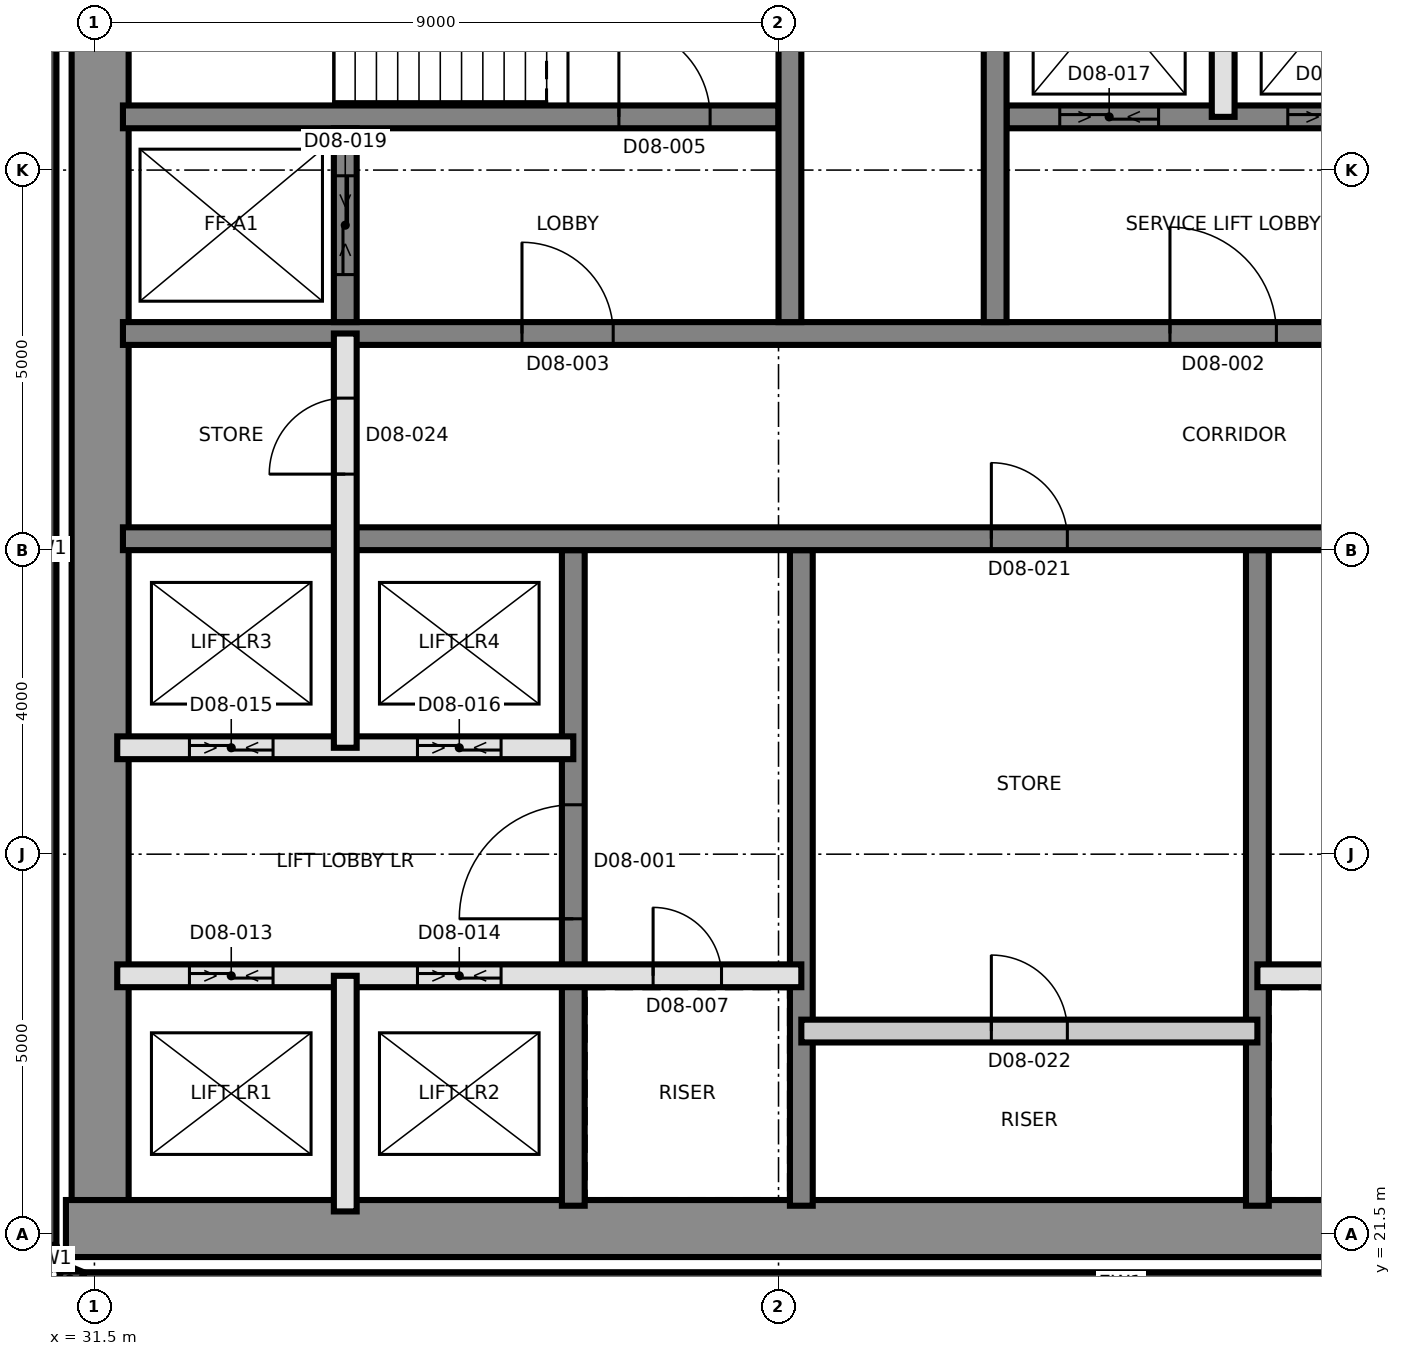
"""IFC4 building model, lengths in metres.
Left out: names, types, materials, properties, quantities, classifications, styles, units other than length and angle.
Written with IfcOpenShell. Run it as: python <this file> out.ifc"""

import sys

from ifc_helpers import new_model, si_unit, direction, frame, frame_2d, origin, place, context, subcontext, project, spatial, rectangle, extrude, element, fill, save


model = new_model("IFC4")
c1 = context("Model", 3, precision=1e-05, world=origin(), true_north=direction((0.0, 1.0)))
c2 = subcontext(c1, "Body", "Model", "MODEL_VIEW")
j1 = project(units=[si_unit("LENGTHUNIT", "METRE"), si_unit("PLANEANGLEUNIT", "RADIAN")], contexts=[c1])
p1 = place(None, origin())
s1 = spatial("IfcSite", under=j1, at=p1, CompositionType="ELEMENT")
p2 = place(p1, origin())
s2 = spatial("IfcBuilding", under=s1, at=p2, CompositionType="ELEMENT")
p3 = place(p2, frame((0.0, 0.0, 98.2)))
s3 = spatial("IfcBuildingStorey", under=s2, at=p3, CompositionType="ELEMENT", Elevation=98.2)
p4 = place(p3, frame((31.575, 21.875, 0.0), z_axis=(0.0, 0.0, 1.0), x_axis=(0.0, 1.0, 0.0)))
e1 = element("IfcWall", 1, at=p4, inside=s3, PredefinedType="SHEAR", context=c2, shape_type="SweptSolid", body=[
    extrude(rectangle(XDim=17.25, YDim=0.75, at=frame_2d((8.625, 0.0))), origin(), (0.0, 0.0, 1.0), 3.7),
])
p5 = place(p3, frame((31.125, 21.575, 0.0), z_axis=(0.0, 0.0, 1.0), x_axis=(1.0, 0.0, 0.0)))
e2 = element("IfcWall", 2, at=p5, inside=s3, PredefinedType="SHEAR", context=c2, shape_type="SweptSolid", body=[
    extrude(rectangle(XDim=27.0, YDim=0.75, at=frame_2d((13.5, 0.0))), origin(), (0.0, 0.0, 1.0), 3.7),
])
p6 = place(p3, frame((37.8, 21.875, 0.0), z_axis=(0.0, 0.0, 1.0), x_axis=(0.0, 1.0, 0.0)))
e3 = element("IfcWall", 3, at=p6, inside=s3, PredefinedType="SHEAR", context=c2, shape_type="SweptSolid", body=[
    extrude(rectangle(XDim=8.625, YDim=0.3, at=frame_2d((4.312, 0.0))), origin(), (0.0, 0.0, 1.0), 3.7),
])
p7 = place(p6, frame((3.775, 0.0, 0.0)))
e4 = element("IfcOpeningElement", 4, at=p7, cuts=e3, PredefinedType="OPENING", context=c2, shape_type="SweptSolid", body=[
    extrude(rectangle(XDim=1.5, YDim=2.1, at=frame_2d((0.75, 1.05))), frame((0.0, 0.16, 0.0), z_axis=(0.0, -1.0, 0.0), x_axis=(1.0, 0.0, 0.0)), (0.0, 0.0, 1.0), 0.32),
])
for number, where, z_axis, x_axis in (
    (5, (40.8, 21.875, 0.0), (0.0, 0.0, 1.0), (0.0, 1.0, 0.0)),
    (6, (46.8, 21.875, 0.0), (0.0, 0.0, 1.0), (0.0, 1.0, 0.0)),
):
    element("IfcWall", number, at=place(p3, frame(where, z_axis=z_axis, x_axis=x_axis)), inside=s3, PredefinedType="SHEAR", context=c2, shape_type="SweptSolid", body=[
        extrude(rectangle(XDim=8.625, YDim=0.3, at=frame_2d((4.312, 0.0))), origin(), (0.0, 0.0, 1.0), 3.7),
    ])
p8 = place(p3, frame((31.875, 30.65, 0.0), z_axis=(0.0, 0.0, 1.0), x_axis=(1.0, 0.0, 0.0)))
e7 = element("IfcWall", 7, at=p8, inside=s3, PredefinedType="SHEAR", context=c2, shape_type="SweptSolid", body=[
    extrude(rectangle(XDim=26.25, YDim=0.3, at=frame_2d((13.125, 0.0))), origin(), (0.0, 0.0, 1.0), 3.7),
])
p9 = place(p8, frame((24.625, 0.0, 0.0)))
e8 = element("IfcOpeningElement", 8, at=p9, cuts=e7, PredefinedType="OPENING", context=c2, shape_type="SweptSolid", body=[
    extrude(rectangle(XDim=1.0, YDim=2.1, at=frame_2d((0.5, 1.05))), frame((0.0, 0.16, 0.0), z_axis=(0.0, -1.0, 0.0), x_axis=(1.0, 0.0, 0.0)), (0.0, 0.0, 1.0), 0.32),
])
p10 = place(p8, frame((11.425, 0.0, 0.0)))
e9 = element("IfcOpeningElement", 9, at=p10, cuts=e7, PredefinedType="OPENING", context=c2, shape_type="SweptSolid", body=[
    extrude(rectangle(XDim=1.0, YDim=2.1, at=frame_2d((0.5, 1.05))), frame((0.0, 0.16, 0.0), z_axis=(0.0, -1.0, 0.0), x_axis=(1.0, 0.0, 0.0)), (0.0, 0.0, 1.0), 0.32),
])
p11 = place(p3, frame((31.875, 33.35, 0.0), z_axis=(0.0, 0.0, 1.0), x_axis=(1.0, 0.0, 0.0)))
e10 = element("IfcWall", 10, at=p11, inside=s3, PredefinedType="SHEAR", context=c2, shape_type="SweptSolid", body=[
    extrude(rectangle(XDim=26.25, YDim=0.3, at=frame_2d((13.125, 0.0))), origin(), (0.0, 0.0, 1.0), 3.7),
])
p12 = place(p11, frame((13.775, 0.0, 0.0)))
e11 = element("IfcOpeningElement", 11, at=p12, cuts=e10, PredefinedType="OPENING", context=c2, shape_type="SweptSolid", body=[
    extrude(rectangle(XDim=1.4, YDim=2.1, at=frame_2d((0.7, 1.05))), frame((0.0, 0.16, 0.0), z_axis=(0.0, -1.0, 0.0), x_axis=(1.0, 0.0, 0.0)), (0.0, 0.0, 1.0), 0.32),
])
p13 = place(p11, frame((5.25, 0.0, 0.0)))
e12 = element("IfcOpeningElement", 12, at=p13, cuts=e10, PredefinedType="OPENING", context=c2, shape_type="SweptSolid", body=[
    extrude(rectangle(XDim=1.2, YDim=2.1, at=frame_2d((0.6, 1.05))), frame((0.0, 0.16, 0.0), z_axis=(0.0, -1.0, 0.0), x_axis=(1.0, 0.0, 0.0)), (0.0, 0.0, 1.0), 0.32),
])
p14 = place(p11, frame((19.8, 0.0, 0.0)))
e13 = element("IfcOpeningElement", 13, at=p14, cuts=e10, PredefinedType="OPENING", context=c2, shape_type="SweptSolid", body=[
    extrude(rectangle(XDim=1.2, YDim=2.1, at=frame_2d((0.6, 1.05))), frame((0.0, 0.16, 0.0), z_axis=(0.0, -1.0, 0.0), x_axis=(1.0, 0.0, 0.0)), (0.0, 0.0, 1.0), 0.32),
])
p15 = place(p3, frame((31.875, 36.2, 0.0), z_axis=(0.0, 0.0, 1.0), x_axis=(1.0, 0.0, 0.0)))
e14 = element("IfcWall", 14, at=p15, inside=s3, PredefinedType="SHEAR", context=c2, shape_type="SweptSolid", body=[
    extrude(rectangle(XDim=8.625, YDim=0.3, at=frame_2d((4.312, 0.0))), origin(), (0.0, 0.0, 1.0), 3.7),
])
p16 = place(p15, frame((6.525, 0.0, 0.0)))
e15 = element("IfcOpeningElement", 15, at=p16, cuts=e14, PredefinedType="OPENING", context=c2, shape_type="SweptSolid", body=[
    extrude(rectangle(XDim=1.2, YDim=2.1, at=frame_2d((0.6, 1.05))), frame((0.0, 0.16, 0.0), z_axis=(0.0, -1.0, 0.0), x_axis=(1.0, 0.0, 0.0)), (0.0, 0.0, 1.0), 0.32),
])
p17 = place(p3, frame((43.5, 36.2, 0.0), z_axis=(0.0, 0.0, 1.0), x_axis=(1.0, 0.0, 0.0)))
e16 = element("IfcWall", 16, at=p17, inside=s3, PredefinedType="SHEAR", context=c2, shape_type="SweptSolid", body=[
    extrude(rectangle(XDim=14.625, YDim=0.3, at=frame_2d((7.312, 0.0))), origin(), (0.0, 0.0, 1.0), 3.7),
])
p18 = place(p17, frame((6.9, 0.0, 0.0)))
e17 = element("IfcOpeningElement", 17, at=p18, cuts=e16, PredefinedType="OPENING", context=c2, shape_type="SweptSolid", body=[
    extrude(rectangle(XDim=1.2, YDim=2.1, at=frame_2d((0.6, 1.05))), frame((0.0, 0.16, 0.0), z_axis=(0.0, -1.0, 0.0), x_axis=(1.0, 0.0, 0.0)), (0.0, 0.0, 1.0), 0.32),
])
p19 = place(p17, frame((0.7, 0.0, 0.0)))
e18 = element("IfcOpeningElement", 18, at=p19, cuts=e16, PredefinedType="OPENING", context=c2, shape_type="SweptSolid", body=[
    extrude(rectangle(XDim=1.3, YDim=2.4, at=frame_2d((0.65, 1.2))), frame((0.0, 0.16, 0.0), z_axis=(0.0, -1.0, 0.0), x_axis=(1.0, 0.0, 0.0)), (0.0, 0.0, 1.0), 0.32),
])
p20 = place(p17, frame((3.7, 0.0, 0.0)))
e19 = element("IfcOpeningElement", 19, at=p20, cuts=e16, PredefinedType="OPENING", context=c2, shape_type="SweptSolid", body=[
    extrude(rectangle(XDim=1.3, YDim=2.4, at=frame_2d((0.65, 1.2))), frame((0.0, 0.16, 0.0), z_axis=(0.0, -1.0, 0.0), x_axis=(1.0, 0.0, 0.0)), (0.0, 0.0, 1.0), 0.32),
])
for number, where, z_axis, x_axis in (
    (20, (40.65, 33.5, 0.0), (0.0, 0.0, 1.0), (0.0, 1.0, 0.0)),
    (21, (43.35, 33.5, 0.0), (0.0, 0.0, 1.0), (0.0, 1.0, 0.0)),
):
    element("IfcWall", number, at=place(p3, frame(where, z_axis=z_axis, x_axis=x_axis)), inside=s3, PredefinedType="SHEAR", context=c2, shape_type="SweptSolid", body=[
        extrude(rectangle(XDim=5.625, YDim=0.3, at=frame_2d((2.812, 0.0))), origin(), (0.0, 0.0, 1.0), 3.7),
    ])
p21 = place(p3, frame((34.8, 33.5, 0.0), z_axis=(0.0, 0.0, 1.0), x_axis=(0.0, 1.0, 0.0)))
e22 = element("IfcWall", 22, at=p21, inside=s3, PredefinedType="SHEAR", context=c2, shape_type="SweptSolid", body=[
    extrude(rectangle(XDim=2.55, YDim=0.3, at=frame_2d((1.275, 0.0))), origin(), (0.0, 0.0, 1.0), 3.7),
])
p22 = place(p21, frame((0.625, 0.0, 0.0)))
e23 = element("IfcOpeningElement", 23, at=p22, cuts=e22, PredefinedType="OPENING", context=c2, shape_type="SweptSolid", body=[
    extrude(rectangle(XDim=1.3, YDim=2.4, at=frame_2d((0.65, 1.2))), frame((0.0, 0.16, 0.0), z_axis=(0.0, -1.0, 0.0), x_axis=(1.0, 0.0, 0.0)), (0.0, 0.0, 1.0), 0.32),
])
p23 = place(p3, frame((30.85, 39.67, 0.0), z_axis=(0.0, 0.0, 1.0), x_axis=(0.0, -1.0, 0.0)))
e24 = element("IfcWall", 24, at=p23, inside=s3, PredefinedType="SOLIDWALL", context=c2, shape_type="SweptSolid", body=[
    extrude(rectangle(XDim=18.31, YDim=0.3, at=frame_2d((9.155, 0.0))), origin(), (0.0, 0.0, 1.0), 3.4),
])
for number, where, z_axis, x_axis in (
    (25, (30.861, 21.302, 0.0), (0.0, 0.0, 1.0), (0.383, -0.924, 0.0)),
    (26, (31.048, 20.967, 0.0), (0.0, 0.0, 1.0), (0.924, -0.383, 0.0)),
):
    element("IfcWall", number, at=place(p3, frame(where, z_axis=z_axis, x_axis=x_axis)), inside=s3, PredefinedType="SOLIDWALL", context=c2, shape_type="SweptSolid", body=[
        extrude(rectangle(XDim=0.275, YDim=0.3, at=frame_2d((0.138, 0.0))), origin(), (0.0, 0.0, 1.0), 3.4),
    ])
p24 = place(p3, frame((31.36, 20.85, 0.0), z_axis=(0.0, 0.0, 1.0), x_axis=(1.0, 0.0, 0.0)))
e27 = element("IfcWall", 27, at=p24, inside=s3, PredefinedType="SOLIDWALL", context=c2, shape_type="SweptSolid", body=[
    extrude(rectangle(XDim=27.281, YDim=0.3, at=frame_2d((13.64, 0.0))), origin(), (0.0, 0.0, 1.0), 3.4),
])
p25 = place(p3, frame((40.8, 24.173, 0.0), z_axis=(0.0, 0.0, 1.0), x_axis=(1.0, 0.0, 0.0)))
e28 = element("IfcWall", 28, at=p25, inside=s3, PredefinedType="PARTITIONING", context=c2, shape_type="SweptSolid", body=[
    extrude(rectangle(XDim=6.0, YDim=0.3, at=frame_2d((3.0, 0.0))), origin(), (0.0, 0.0, 1.0), 3.4),
])
p26 = place(p25, frame((2.5, 0.0, 0.0)))
e29 = element("IfcOpeningElement", 29, at=p26, cuts=e28, PredefinedType="OPENING", context=c2, shape_type="SweptSolid", body=[
    extrude(rectangle(XDim=1.0, YDim=2.1, at=frame_2d((0.5, 1.05))), frame((0.0, 0.16, 0.0), z_axis=(0.0, -1.0, 0.0), x_axis=(1.0, 0.0, 0.0)), (0.0, 0.0, 1.0), 0.32),
])
p27 = place(p3, frame((31.8, 24.9, 0.0), z_axis=(0.0, 0.0, 1.0), x_axis=(1.0, 0.0, 0.0)))
e30 = element("IfcWall", 30, at=p27, inside=s3, PredefinedType="SOLIDWALL", context=c2, shape_type="SweptSolid", body=[
    extrude(rectangle(XDim=9.0, YDim=0.3, at=frame_2d((4.5, 0.0))), origin(), (0.0, 0.0, 1.0), 3.4),
])
p28 = place(p27, frame((7.05, 0.0, 0.0)))
e31 = element("IfcOpeningElement", 31, at=p28, cuts=e30, PredefinedType="OPENING", context=c2, shape_type="SweptSolid", body=[
    extrude(rectangle(XDim=0.9, YDim=2.1, at=frame_2d((0.45, 1.05))), frame((0.0, 0.16, 0.0), z_axis=(0.0, -1.0, 0.0), x_axis=(1.0, 0.0, 0.0)), (0.0, 0.0, 1.0), 0.32),
])
p29 = place(p27, frame((0.95, 0.0, 0.0)))
e32 = element("IfcOpeningElement", 32, at=p29, cuts=e30, PredefinedType="OPENING", context=c2, shape_type="SweptSolid", body=[
    extrude(rectangle(XDim=1.1, YDim=2.4, at=frame_2d((0.55, 1.2))), frame((0.0, 0.16, 0.0), z_axis=(0.0, -1.0, 0.0), x_axis=(1.0, 0.0, 0.0)), (0.0, 0.0, 1.0), 0.32),
])
p30 = place(p27, frame((3.95, 0.0, 0.0)))
e33 = element("IfcOpeningElement", 33, at=p30, cuts=e30, PredefinedType="OPENING", context=c2, shape_type="SweptSolid", body=[
    extrude(rectangle(XDim=1.1, YDim=2.4, at=frame_2d((0.55, 1.2))), frame((0.0, 0.16, 0.0), z_axis=(0.0, -1.0, 0.0), x_axis=(1.0, 0.0, 0.0)), (0.0, 0.0, 1.0), 0.32),
])
p31 = place(p3, frame((46.8, 24.9, 0.0), z_axis=(0.0, 0.0, 1.0), x_axis=(1.0, 0.0, 0.0)))
e34 = element("IfcWall", 34, at=p31, inside=s3, PredefinedType="SOLIDWALL", context=c2, shape_type="SweptSolid", body=[
    extrude(rectangle(XDim=9.0, YDim=0.3, at=frame_2d((4.5, 0.0))), origin(), (0.0, 0.0, 1.0), 3.4),
])
p32 = place(p31, frame((1.05, 0.0, 0.0)))
e35 = element("IfcOpeningElement", 35, at=p32, cuts=e34, PredefinedType="OPENING", context=c2, shape_type="SweptSolid", body=[
    extrude(rectangle(XDim=0.9, YDim=2.1, at=frame_2d((0.45, 1.05))), frame((0.0, 0.16, 0.0), z_axis=(0.0, -1.0, 0.0), x_axis=(1.0, 0.0, 0.0)), (0.0, 0.0, 1.0), 0.32),
])
p33 = place(p3, frame((31.8, 27.9, 0.0), z_axis=(0.0, 0.0, 1.0), x_axis=(1.0, 0.0, 0.0)))
e36 = element("IfcWall", 36, at=p33, inside=s3, PredefinedType="SOLIDWALL", context=c2, shape_type="SweptSolid", body=[
    extrude(rectangle(XDim=6.0, YDim=0.3, at=frame_2d((3.0, 0.0))), origin(), (0.0, 0.0, 1.0), 3.4),
])
p34 = place(p33, frame((0.95, 0.0, 0.0)))
e37 = element("IfcOpeningElement", 37, at=p34, cuts=e36, PredefinedType="OPENING", context=c2, shape_type="SweptSolid", body=[
    extrude(rectangle(XDim=1.1, YDim=2.4, at=frame_2d((0.55, 1.2))), frame((0.0, 0.16, 0.0), z_axis=(0.0, -1.0, 0.0), x_axis=(1.0, 0.0, 0.0)), (0.0, 0.0, 1.0), 0.32),
])
p35 = place(p33, frame((3.95, 0.0, 0.0)))
e38 = element("IfcOpeningElement", 38, at=p35, cuts=e36, PredefinedType="OPENING", context=c2, shape_type="SweptSolid", body=[
    extrude(rectangle(XDim=1.1, YDim=2.4, at=frame_2d((0.55, 1.2))), frame((0.0, 0.16, 0.0), z_axis=(0.0, -1.0, 0.0), x_axis=(1.0, 0.0, 0.0)), (0.0, 0.0, 1.0), 0.32),
])
p36 = place(p3, frame((34.8, 21.8, 0.0), z_axis=(0.0, 0.0, 1.0), x_axis=(0.0, 1.0, 0.0)))
e39 = element("IfcWall", 39, at=p36, inside=s3, PredefinedType="SOLIDWALL", context=c2, shape_type="SweptSolid", body=[
    extrude(rectangle(XDim=3.1, YDim=0.3, at=frame_2d((1.55, 0.0))), origin(), (0.0, 0.0, 1.0), 3.4),
])
p37 = place(p3, frame((34.8, 27.9, 0.0), z_axis=(0.0, 0.0, 1.0), x_axis=(0.0, 1.0, 0.0)))
e40 = element("IfcWall", 40, at=p37, inside=s3, PredefinedType="SOLIDWALL", context=c2, shape_type="SweptSolid", body=[
    extrude(rectangle(XDim=5.45, YDim=0.3, at=frame_2d((2.725, 0.0))), origin(), (0.0, 0.0, 1.0), 3.4),
])
p38 = place(p37, frame((3.6, 0.0, 0.0)))
e41 = element("IfcOpeningElement", 41, at=p38, cuts=e40, PredefinedType="OPENING", context=c2, shape_type="SweptSolid", body=[
    extrude(rectangle(XDim=1.0, YDim=2.1, at=frame_2d((0.5, 1.05))), frame((0.0, 0.16, 0.0), z_axis=(0.0, -1.0, 0.0), x_axis=(1.0, 0.0, 0.0)), (0.0, 0.0, 1.0), 0.32),
])
p39 = place(p3, frame((46.35, 36.2, 0.0), z_axis=(0.0, 0.0, 1.0), x_axis=(0.0, 1.0, 0.0)))
e42 = element("IfcWall", 42, at=p39, inside=s3, PredefinedType="SOLIDWALL", context=c2, shape_type="SweptSolid", body=[
    extrude(rectangle(XDim=3.0, YDim=0.3, at=frame_2d((1.5, 0.0))), origin(), (0.0, 0.0, 1.0), 3.4),
])
p40 = place(p7, origin())
e43 = element("IfcDoor", 43, at=p40, inside=s3, OperationType="SINGLE_SWING_LEFT", PredefinedType="DOOR", context=c2, shape_type="SweptSolid", body=[
    extrude(rectangle(XDim=1.5, YDim=2.1, at=frame_2d((0.75, 1.05))), frame((0.0, 0.025, 0.0), z_axis=(0.0, -1.0, 0.0), x_axis=(1.0, 0.0, 0.0)), (0.0, 0.0, 1.0), 0.05),
])
fill(e4, e43)
p41 = place(p12, origin())
e44 = element("IfcDoor", 44, at=p41, inside=s3, OperationType="SINGLE_SWING_RIGHT", PredefinedType="DOOR", context=c2, shape_type="SweptSolid", body=[
    extrude(rectangle(XDim=1.4, YDim=2.1, at=frame_2d((0.7, 1.05))), frame((0.0, 0.025, 0.0), z_axis=(0.0, -1.0, 0.0), x_axis=(1.0, 0.0, 0.0)), (0.0, 0.0, 1.0), 0.05),
])
fill(e11, e44)
p42 = place(p13, origin())
e45 = element("IfcDoor", 45, at=p42, inside=s3, OperationType="SINGLE_SWING_LEFT", PredefinedType="DOOR", context=c2, shape_type="SweptSolid", body=[
    extrude(rectangle(XDim=1.2, YDim=2.1, at=frame_2d((0.6, 1.05))), frame((0.0, 0.025, 0.0), z_axis=(0.0, -1.0, 0.0), x_axis=(1.0, 0.0, 0.0)), (0.0, 0.0, 1.0), 0.05),
])
fill(e12, e45)
p43 = place(p16, origin())
e46 = element("IfcDoor", 46, at=p43, inside=s3, OperationType="SINGLE_SWING_RIGHT", PredefinedType="DOOR", context=c2, shape_type="SweptSolid", body=[
    extrude(rectangle(XDim=1.2, YDim=2.1, at=frame_2d((0.6, 1.05))), frame((0.0, 0.025, 0.0), z_axis=(0.0, -1.0, 0.0), x_axis=(1.0, 0.0, 0.0)), (0.0, 0.0, 1.0), 0.05),
])
fill(e15, e46)
p44 = place(p28, origin())
e47 = element("IfcDoor", 47, at=p44, inside=s3, OperationType="SINGLE_SWING_LEFT", PredefinedType="DOOR", context=c2, shape_type="SweptSolid", body=[
    extrude(rectangle(XDim=0.9, YDim=2.1, at=frame_2d((0.45, 1.05))), frame((0.0, 0.025, 0.0), z_axis=(0.0, -1.0, 0.0), x_axis=(1.0, 0.0, 0.0)), (0.0, 0.0, 1.0), 0.05),
])
fill(e31, e47)
p45 = place(p29, origin())
e48 = element("IfcDoor", 48, at=p45, inside=s3, OperationType="SLIDING_TO_LEFT", PredefinedType="DOOR", context=c2, shape_type="SweptSolid", body=[
    extrude(rectangle(XDim=1.1, YDim=2.4, at=frame_2d((0.55, 1.2))), frame((0.0, 0.025, 0.0), z_axis=(0.0, -1.0, 0.0), x_axis=(1.0, 0.0, 0.0)), (0.0, 0.0, 1.0), 0.05),
])
fill(e32, e48)
p46 = place(p30, origin())
e49 = element("IfcDoor", 49, at=p46, inside=s3, OperationType="SLIDING_TO_LEFT", PredefinedType="DOOR", context=c2, shape_type="SweptSolid", body=[
    extrude(rectangle(XDim=1.1, YDim=2.4, at=frame_2d((0.55, 1.2))), frame((0.0, 0.025, 0.0), z_axis=(0.0, -1.0, 0.0), x_axis=(1.0, 0.0, 0.0)), (0.0, 0.0, 1.0), 0.05),
])
fill(e33, e49)
p47 = place(p34, origin())
e50 = element("IfcDoor", 50, at=p47, inside=s3, OperationType="SLIDING_TO_LEFT", PredefinedType="DOOR", context=c2, shape_type="SweptSolid", body=[
    extrude(rectangle(XDim=1.1, YDim=2.4, at=frame_2d((0.55, 1.2))), frame((0.0, 0.025, 0.0), z_axis=(0.0, -1.0, 0.0), x_axis=(1.0, 0.0, 0.0)), (0.0, 0.0, 1.0), 0.05),
])
fill(e37, e50)
p48 = place(p35, origin())
e51 = element("IfcDoor", 51, at=p48, inside=s3, OperationType="SLIDING_TO_LEFT", PredefinedType="DOOR", context=c2, shape_type="SweptSolid", body=[
    extrude(rectangle(XDim=1.1, YDim=2.4, at=frame_2d((0.55, 1.2))), frame((0.0, 0.025, 0.0), z_axis=(0.0, -1.0, 0.0), x_axis=(1.0, 0.0, 0.0)), (0.0, 0.0, 1.0), 0.05),
])
fill(e38, e51)
p49 = place(p19, origin())
e52 = element("IfcDoor", 52, at=p49, inside=s3, OperationType="SLIDING_TO_LEFT", PredefinedType="DOOR", context=c2, shape_type="SweptSolid", body=[
    extrude(rectangle(XDim=1.3, YDim=2.4, at=frame_2d((0.65, 1.2))), frame((0.0, 0.025, 0.0), z_axis=(0.0, -1.0, 0.0), x_axis=(1.0, 0.0, 0.0)), (0.0, 0.0, 1.0), 0.05),
])
fill(e18, e52)
p50 = place(p20, origin())
e53 = element("IfcDoor", 53, at=p50, inside=s3, OperationType="SLIDING_TO_LEFT", PredefinedType="DOOR", context=c2, shape_type="SweptSolid", body=[
    extrude(rectangle(XDim=1.3, YDim=2.4, at=frame_2d((0.65, 1.2))), frame((0.0, 0.025, 0.0), z_axis=(0.0, -1.0, 0.0), x_axis=(1.0, 0.0, 0.0)), (0.0, 0.0, 1.0), 0.05),
])
fill(e19, e53)
p51 = place(p22, origin())
e54 = element("IfcDoor", 54, at=p51, inside=s3, OperationType="SLIDING_TO_LEFT", PredefinedType="DOOR", context=c2, shape_type="SweptSolid", body=[
    extrude(rectangle(XDim=1.3, YDim=2.4, at=frame_2d((0.65, 1.2))), frame((0.0, 0.025, 0.0), z_axis=(0.0, -1.0, 0.0), x_axis=(1.0, 0.0, 0.0)), (0.0, 0.0, 1.0), 0.05),
])
fill(e23, e54)
p52 = place(p10, origin())
e55 = element("IfcDoor", 55, at=p52, inside=s3, OperationType="SINGLE_SWING_LEFT", PredefinedType="DOOR", context=c2, shape_type="SweptSolid", body=[
    extrude(rectangle(XDim=1.0, YDim=2.1, at=frame_2d((0.5, 1.05))), frame((0.0, 0.025, 0.0), z_axis=(0.0, -1.0, 0.0), x_axis=(1.0, 0.0, 0.0)), (0.0, 0.0, 1.0), 0.05),
])
fill(e9, e55)
p53 = place(p26, origin())
e56 = element("IfcDoor", 56, at=p53, inside=s3, OperationType="SINGLE_SWING_RIGHT", PredefinedType="DOOR", context=c2, shape_type="SweptSolid", body=[
    extrude(rectangle(XDim=1.0, YDim=2.1, at=frame_2d((0.5, 1.05))), frame((0.0, 0.025, 0.0), z_axis=(0.0, -1.0, 0.0), x_axis=(1.0, 0.0, 0.0)), (0.0, 0.0, 1.0), 0.05),
])
fill(e29, e56)
p54 = place(p38, origin())
e57 = element("IfcDoor", 57, at=p54, inside=s3, OperationType="SINGLE_SWING_RIGHT", PredefinedType="DOOR", context=c2, shape_type="SweptSolid", body=[
    extrude(rectangle(XDim=1.0, YDim=2.1, at=frame_2d((0.5, 1.05))), frame((0.0, 0.025, 0.0), z_axis=(0.0, -1.0, 0.0), x_axis=(1.0, 0.0, 0.0)), (0.0, 0.0, 1.0), 0.05),
])
fill(e41, e57)
save(model, sys.argv[1])
